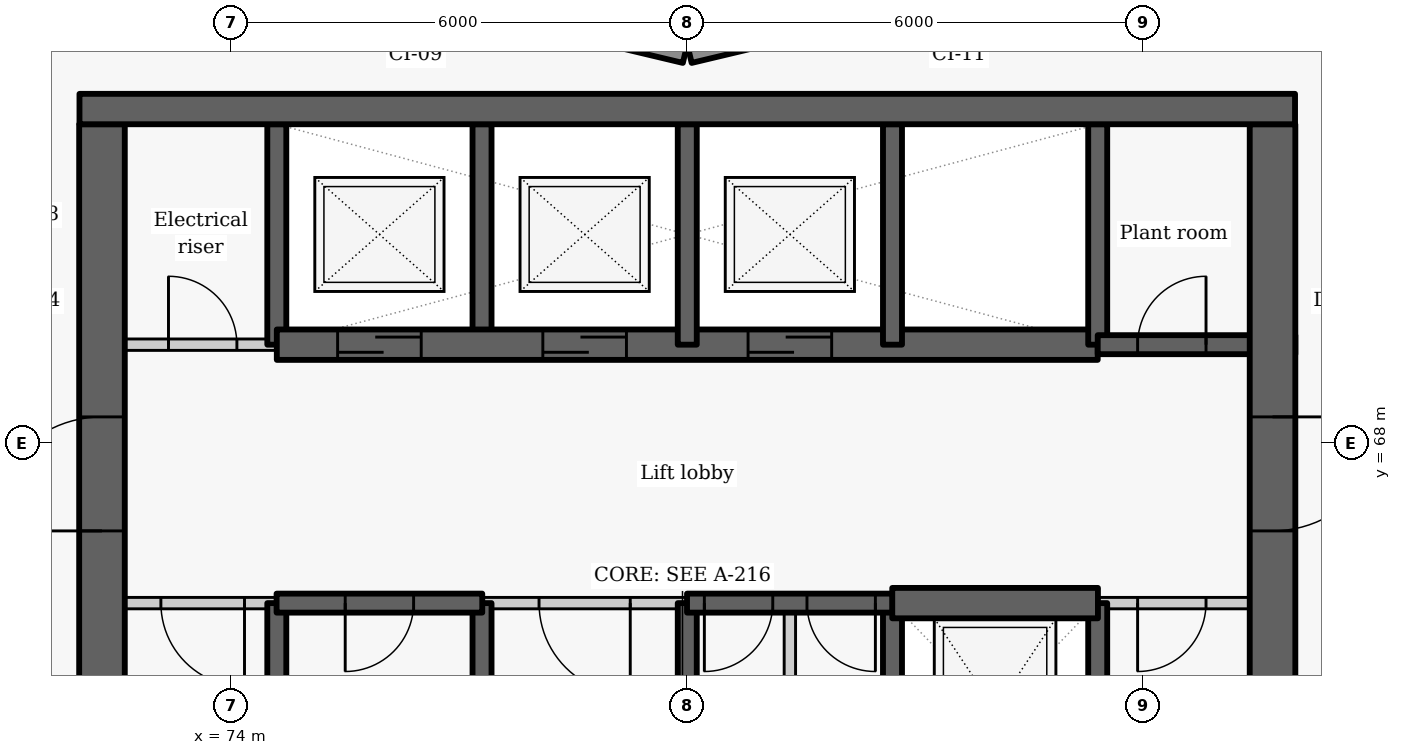
"""IFC4 building model, lengths in metres.
Left out: names, types, materials, properties, quantities, classifications, styles, units other than length and angle.
Written with IfcOpenShell. Run it as: python <this file> out.ifc"""

import sys

from ifc_helpers import new_model, si_unit, direction, frame, frame_2d, origin, place, context, subcontext, project, spatial, rectangle, extrude, element, fill, save


model = new_model("IFC4")
c1 = context("Model", 3, precision=1e-05, world=origin(), true_north=direction((0.0, 1.0)))
c2 = subcontext(c1, "Body", "Model", "MODEL_VIEW")
j1 = project(units=[si_unit("LENGTHUNIT", "METRE"), si_unit("PLANEANGLEUNIT", "RADIAN")], contexts=[c1])
p1 = place(None, origin())
s1 = spatial("IfcSite", under=j1, at=p1, CompositionType="ELEMENT")
p2 = place(p1, origin())
s2 = spatial("IfcBuilding", under=s1, at=p2, CompositionType="ELEMENT")
p3 = place(p2, frame((0.0, 0.0, 77.7)))
s3 = spatial("IfcBuildingStorey", under=s2, at=p3, CompositionType="ELEMENT", Elevation=77.7)
for number, where, z_axis, x_axis in (
    (1, (83.186, 73.881, 0.0), (0.0, 0.0, 1.0), (-0.973, -0.232, 0.0)),
    (2, (79.971, 73.128, 0.0), (0.0, 0.0, 1.0), (-0.973, 0.232, 0.0)),
):
    element("IfcWall", number, at=place(p3, frame(where, z_axis=z_axis, x_axis=x_axis)), inside=s3, PredefinedType="SOLIDWALL", context=c2, shape_type="SweptSolid", body=[
        extrude(rectangle(XDim=3.246, YDim=0.25, at=frame_2d((1.623, 0.0))), origin(), (0.0, 0.0, 1.0), 2.425),
    ])
p4 = place(p3, frame((74.6, 63.1, -0.41), z_axis=(0.0, 0.0, 1.0), x_axis=(0.0, 1.0, 0.0)))
e3 = element("IfcWall", 3, at=p4, inside=s3, PredefinedType="SHEAR", context=c2, shape_type="SweptSolid", body=[
    extrude(rectangle(XDim=2.8, YDim=0.25, at=frame_2d((1.4, 0.0))), origin(), (0.0, 0.0, 1.0), 3.435),
])
p5 = place(p3, frame((74.6, 69.3, -0.41), z_axis=(0.0, 0.0, 1.0), x_axis=(0.0, 1.0, 0.0)))
e4 = element("IfcWall", 4, at=p5, inside=s3, PredefinedType="SHEAR", context=c2, shape_type="SweptSolid", body=[
    extrude(rectangle(XDim=2.9, YDim=0.25, at=frame_2d((1.45, 0.0))), origin(), (0.0, 0.0, 1.0), 3.435),
])
p6 = place(p3, frame((72.0, 69.3, 0.0), z_axis=(0.0, 0.0, 1.0), x_axis=(1.0, 0.0, 0.0)))
e5 = element("IfcWall", 5, at=p6, inside=s3, PredefinedType="PARTITIONING", context=c2, shape_type="SweptSolid", body=[
    extrude(rectangle(XDim=2.6, YDim=0.15, at=frame_2d((1.3, 0.0))), origin(), (0.0, 0.0, 1.0), 3.025),
])
p7 = place(p6, frame((1.175, 0.0, 0.0)))
e6 = element("IfcOpeningElement", 6, at=p7, cuts=e5, PredefinedType="OPENING", context=c2, shape_type="SweptSolid", body=[
    extrude(rectangle(XDim=0.9, YDim=2.1, at=frame_2d((0.45, 1.05))), frame((0.0, 0.085, 0.0), z_axis=(0.0, -1.0, 0.0), x_axis=(1.0, 0.0, 0.0)), (0.0, 0.0, 1.0), 0.17),
])
p8 = place(p3, frame((72.3, 63.1, -0.41), z_axis=(0.0, 0.0, 1.0), x_axis=(0.0, 1.0, 0.0)))
e7 = element("IfcWall", 7, at=p8, inside=s3, PredefinedType="SHEAR", context=c2, shape_type="SweptSolid", body=[
    extrude(rectangle(XDim=9.1, YDim=0.6, at=frame_2d((4.55, 0.0))), origin(), (0.0, 0.0, 1.0), 3.435),
])
p9 = place(p8, frame((3.75, 0.0, 0.41)))
e8 = element("IfcOpeningElement", 8, at=p9, cuts=e7, PredefinedType="OPENING", context=c2, shape_type="SweptSolid", body=[
    extrude(rectangle(XDim=1.5, YDim=2.1, at=frame_2d((0.75, 1.05))), frame((0.0, 0.31, 0.0), z_axis=(0.0, -1.0, 0.0), x_axis=(1.0, 0.0, 0.0)), (0.0, 0.0, 1.0), 0.62),
])
p10 = place(p3, frame((77.3, 63.1, -0.41), z_axis=(0.0, 0.0, 1.0), x_axis=(0.0, 1.0, 0.0)))
e9 = element("IfcWall", 9, at=p10, inside=s3, PredefinedType="SHEAR", context=c2, shape_type="SweptSolid", body=[
    extrude(rectangle(XDim=2.8, YDim=0.25, at=frame_2d((1.4, 0.0))), origin(), (0.0, 0.0, 1.0), 3.435),
])
p11 = place(p3, frame((77.3, 69.3, -0.41), z_axis=(0.0, 0.0, 1.0), x_axis=(0.0, 1.0, 0.0)))
e10 = element("IfcWall", 10, at=p11, inside=s3, PredefinedType="SHEAR", context=c2, shape_type="SweptSolid", body=[
    extrude(rectangle(XDim=2.9, YDim=0.25, at=frame_2d((1.45, 0.0))), origin(), (0.0, 0.0, 1.0), 3.435),
])
p12 = place(p3, frame((74.6, 69.3, -0.41), z_axis=(0.0, 0.0, 1.0), x_axis=(1.0, 0.0, 0.0)))
e11 = element("IfcWall", 11, at=p12, inside=s3, PredefinedType="SHEAR", context=c2, shape_type="SweptSolid", body=[
    extrude(rectangle(XDim=10.8, YDim=0.4, at=frame_2d((5.4, 0.0))), origin(), (0.0, 0.0, 1.0), 3.435),
])
p13 = place(p12, frame((0.8, 0.0, 0.41)))
e12 = element("IfcOpeningElement", 12, at=p13, cuts=e11, PredefinedType="OPENING", context=c2, shape_type="SweptSolid", body=[
    extrude(rectangle(XDim=1.1, YDim=2.1, at=frame_2d((0.55, 1.05))), frame((0.0, 0.21, 0.0), z_axis=(0.0, -1.0, 0.0), x_axis=(1.0, 0.0, 0.0)), (0.0, 0.0, 1.0), 0.42),
])
p14 = place(p12, frame((3.5, 0.0, 0.41)))
e13 = element("IfcOpeningElement", 13, at=p14, cuts=e11, PredefinedType="OPENING", context=c2, shape_type="SweptSolid", body=[
    extrude(rectangle(XDim=1.1, YDim=2.1, at=frame_2d((0.55, 1.05))), frame((0.0, 0.21, 0.0), z_axis=(0.0, -1.0, 0.0), x_axis=(1.0, 0.0, 0.0)), (0.0, 0.0, 1.0), 0.42),
])
p15 = place(p12, frame((6.2, 0.0, 0.41)))
e14 = element("IfcOpeningElement", 14, at=p15, cuts=e11, PredefinedType="OPENING", context=c2, shape_type="SweptSolid", body=[
    extrude(rectangle(XDim=1.1, YDim=2.1, at=frame_2d((0.55, 1.05))), frame((0.0, 0.21, 0.0), z_axis=(0.0, -1.0, 0.0), x_axis=(1.0, 0.0, 0.0)), (0.0, 0.0, 1.0), 0.42),
])
p16 = place(p3, frame((80.0, 63.1, -0.41), z_axis=(0.0, 0.0, 1.0), x_axis=(0.0, 1.0, 0.0)))
e15 = element("IfcWall", 15, at=p16, inside=s3, PredefinedType="SHEAR", context=c2, shape_type="SweptSolid", body=[
    extrude(rectangle(XDim=2.8, YDim=0.25, at=frame_2d((1.4, 0.0))), origin(), (0.0, 0.0, 1.0), 3.435),
])
p17 = place(p3, frame((80.0, 69.3, -0.41), z_axis=(0.0, 0.0, 1.0), x_axis=(0.0, 1.0, 0.0)))
e16 = element("IfcWall", 16, at=p17, inside=s3, PredefinedType="SHEAR", context=c2, shape_type="SweptSolid", body=[
    extrude(rectangle(XDim=2.9, YDim=0.25, at=frame_2d((1.45, 0.0))), origin(), (0.0, 0.0, 1.0), 3.435),
])
p18 = place(p3, frame((82.7, 63.1, -0.41), z_axis=(0.0, 0.0, 1.0), x_axis=(0.0, 1.0, 0.0)))
e17 = element("IfcWall", 17, at=p18, inside=s3, PredefinedType="SHEAR", context=c2, shape_type="SweptSolid", body=[
    extrude(rectangle(XDim=2.8, YDim=0.25, at=frame_2d((1.4, 0.0))), origin(), (0.0, 0.0, 1.0), 3.435),
])
p19 = place(p3, frame((82.7, 69.3, -0.41), z_axis=(0.0, 0.0, 1.0), x_axis=(0.0, 1.0, 0.0)))
e18 = element("IfcWall", 18, at=p19, inside=s3, PredefinedType="SHEAR", context=c2, shape_type="SweptSolid", body=[
    extrude(rectangle(XDim=2.9, YDim=0.25, at=frame_2d((1.45, 0.0))), origin(), (0.0, 0.0, 1.0), 3.435),
])
p20 = place(p3, frame((85.4, 63.1, -0.41), z_axis=(0.0, 0.0, 1.0), x_axis=(0.0, 1.0, 0.0)))
e19 = element("IfcWall", 19, at=p20, inside=s3, PredefinedType="SHEAR", context=c2, shape_type="SweptSolid", body=[
    extrude(rectangle(XDim=2.8, YDim=0.25, at=frame_2d((1.4, 0.0))), origin(), (0.0, 0.0, 1.0), 3.435),
])
p21 = place(p3, frame((85.4, 69.3, -0.41), z_axis=(0.0, 0.0, 1.0), x_axis=(0.0, 1.0, 0.0)))
e20 = element("IfcWall", 20, at=p21, inside=s3, PredefinedType="SHEAR", context=c2, shape_type="SweptSolid", body=[
    extrude(rectangle(XDim=2.9, YDim=0.25, at=frame_2d((1.45, 0.0))), origin(), (0.0, 0.0, 1.0), 3.435),
])
p22 = place(p3, frame((85.4, 69.3, -0.41), z_axis=(0.0, 0.0, 1.0), x_axis=(1.0, 0.0, 0.0)))
e21 = element("IfcWall", 21, at=p22, inside=s3, PredefinedType="SHEAR", context=c2, shape_type="SweptSolid", body=[
    extrude(rectangle(XDim=2.6, YDim=0.25, at=frame_2d((1.3, 0.0))), origin(), (0.0, 0.0, 1.0), 3.435),
])
p23 = place(p22, frame((0.525, 0.0, 0.41)))
e22 = element("IfcOpeningElement", 22, at=p23, cuts=e21, PredefinedType="OPENING", context=c2, shape_type="SweptSolid", body=[
    extrude(rectangle(XDim=0.9, YDim=2.1, at=frame_2d((0.45, 1.05))), frame((0.0, 0.135, 0.0), z_axis=(0.0, -1.0, 0.0), x_axis=(1.0, 0.0, 0.0)), (0.0, 0.0, 1.0), 0.27),
])
p24 = place(p3, frame((87.7, 72.2, -0.41), z_axis=(0.0, 0.0, 1.0), x_axis=(0.0, -1.0, 0.0)))
e23 = element("IfcWall", 23, at=p24, inside=s3, PredefinedType="SHEAR", context=c2, shape_type="SweptSolid", body=[
    extrude(rectangle(XDim=15.6, YDim=0.6, at=frame_2d((7.8, 0.0))), origin(), (0.0, 0.0, 1.0), 3.435),
])
p25 = place(p24, frame((3.85, 0.0, 0.41)))
e24 = element("IfcOpeningElement", 24, at=p25, cuts=e23, PredefinedType="OPENING", context=c2, shape_type="SweptSolid", body=[
    extrude(rectangle(XDim=1.5, YDim=2.1, at=frame_2d((0.75, 1.05))), frame((0.0, 0.31, 0.0), z_axis=(0.0, -1.0, 0.0), x_axis=(1.0, 0.0, 0.0)), (0.0, 0.0, 1.0), 0.62),
])
p26 = place(p24, frame((11.8, 0.0, 0.41)))
e25 = element("IfcOpeningElement", 25, at=p26, cuts=e23, PredefinedType="OPENING", context=c2, shape_type="SweptSolid", body=[
    extrude(rectangle(XDim=1.1, YDim=2.1, at=frame_2d((0.55, 1.05))), frame((0.0, 0.31, 0.0), z_axis=(0.0, -1.0, 0.0), x_axis=(1.0, 0.0, 0.0)), (0.0, 0.0, 1.0), 0.62),
])
p27 = place(p3, frame((74.603, 65.9, 0.0), z_axis=(0.0, 0.0, 1.0), x_axis=(-1.0, 0.0, 0.0)))
e26 = element("IfcWall", 26, at=p27, inside=s3, PredefinedType="PARTITIONING", context=c2, shape_type="SweptSolid", body=[
    extrude(rectangle(XDim=2.603, YDim=0.15, at=frame_2d((1.302, 0.0))), origin(), (0.0, 0.0, 1.0), 3.025),
])
p28 = place(p27, frame((0.428, 0.0, 0.0)))
e27 = element("IfcOpeningElement", 27, at=p28, cuts=e26, PredefinedType="OPENING", context=c2, shape_type="SweptSolid", body=[
    extrude(rectangle(XDim=1.1, YDim=2.1, at=frame_2d((0.55, 1.05))), frame((0.0, 0.085, 0.0), z_axis=(0.0, -1.0, 0.0), x_axis=(1.0, 0.0, 0.0)), (0.0, 0.0, 1.0), 0.17),
])
p29 = place(p3, frame((80.003, 65.9, 0.0), z_axis=(0.0, 0.0, 1.0), x_axis=(-1.0, 0.0, 0.0)))
e28 = element("IfcWall", 28, at=p29, inside=s3, PredefinedType="PARTITIONING", context=c2, shape_type="SweptSolid", body=[
    extrude(rectangle(XDim=2.706, YDim=0.15, at=frame_2d((1.353, 0.0))), origin(), (0.0, 0.0, 1.0), 3.025),
])
p30 = place(p29, frame((0.753, 0.0, 0.0)))
e29 = element("IfcOpeningElement", 29, at=p30, cuts=e28, PredefinedType="OPENING", context=c2, shape_type="SweptSolid", body=[
    extrude(rectangle(XDim=1.2, YDim=2.1, at=frame_2d((0.6, 1.05))), frame((0.0, 0.085, 0.0), z_axis=(0.0, -1.0, 0.0), x_axis=(1.0, 0.0, 0.0)), (0.0, 0.0, 1.0), 0.17),
])
p31 = place(p3, frame((88.0, 65.9, 0.0), z_axis=(0.0, 0.0, 1.0), x_axis=(-1.0, 0.0, 0.0)))
e30 = element("IfcWall", 30, at=p31, inside=s3, PredefinedType="PARTITIONING", context=c2, shape_type="SweptSolid", body=[
    extrude(rectangle(XDim=2.603, YDim=0.15, at=frame_2d((1.302, 0.0))), origin(), (0.0, 0.0, 1.0), 3.025),
])
p32 = place(p31, frame((1.175, 0.0, 0.0)))
e31 = element("IfcOpeningElement", 31, at=p32, cuts=e30, PredefinedType="OPENING", context=c2, shape_type="SweptSolid", body=[
    extrude(rectangle(XDim=0.9, YDim=2.1, at=frame_2d((0.45, 1.05))), frame((0.0, 0.085, 0.0), z_axis=(0.0, -1.0, 0.0), x_axis=(1.0, 0.0, 0.0)), (0.0, 0.0, 1.0), 0.17),
])
p33 = place(p3, frame((77.303, 65.9, -0.41), z_axis=(0.0, 0.0, 1.0), x_axis=(-1.0, 0.0, 0.0)))
e32 = element("IfcWall", 32, at=p33, inside=s3, PredefinedType="SHEAR", context=c2, shape_type="SweptSolid", body=[
    extrude(rectangle(XDim=2.706, YDim=0.25, at=frame_2d((1.353, 0.0))), origin(), (0.0, 0.0, 1.0), 3.435),
])
p34 = place(p33, frame((0.903, 0.0, 0.41)))
e33 = element("IfcOpeningElement", 33, at=p34, cuts=e32, PredefinedType="OPENING", context=c2, shape_type="SweptSolid", body=[
    extrude(rectangle(XDim=0.9, YDim=2.1, at=frame_2d((0.45, 1.05))), frame((0.0, 0.135, 0.0), z_axis=(0.0, -1.0, 0.0), x_axis=(1.0, 0.0, 0.0)), (0.0, 0.0, 1.0), 0.27),
])
p35 = place(p3, frame((82.703, 65.9, -0.41), z_axis=(0.0, 0.0, 1.0), x_axis=(-1.0, 0.0, 0.0)))
e34 = element("IfcWall", 34, at=p35, inside=s3, PredefinedType="SHEAR", context=c2, shape_type="SweptSolid", body=[
    extrude(rectangle(XDim=2.706, YDim=0.25, at=frame_2d((1.353, 0.0))), origin(), (0.0, 0.0, 1.0), 3.435),
])
p36 = place(p35, frame((1.578, 0.0, 0.41)))
e35 = element("IfcOpeningElement", 35, at=p36, cuts=e34, PredefinedType="OPENING", context=c2, shape_type="SweptSolid", body=[
    extrude(rectangle(XDim=0.9, YDim=2.1, at=frame_2d((0.45, 1.05))), frame((0.0, 0.135, 0.0), z_axis=(0.0, -1.0, 0.0), x_axis=(1.0, 0.0, 0.0)), (0.0, 0.0, 1.0), 0.27),
])
p37 = place(p35, frame((0.228, 0.0, 0.41)))
e36 = element("IfcOpeningElement", 36, at=p37, cuts=e34, PredefinedType="OPENING", context=c2, shape_type="SweptSolid", body=[
    extrude(rectangle(XDim=0.9, YDim=2.1, at=frame_2d((0.45, 1.05))), frame((0.0, 0.135, 0.0), z_axis=(0.0, -1.0, 0.0), x_axis=(1.0, 0.0, 0.0)), (0.0, 0.0, 1.0), 0.27),
])
p38 = place(p3, frame((82.697, 65.9, -0.41), z_axis=(0.0, 0.0, 1.0), x_axis=(1.0, 0.0, 0.0)))
e37 = element("IfcWall", 37, at=p38, inside=s3, PredefinedType="SHEAR", context=c2, shape_type="SweptSolid", body=[
    extrude(rectangle(XDim=2.706, YDim=0.4, at=frame_2d((1.353, 0.0))), origin(), (0.0, 0.0, 1.0), 3.435),
])
p39 = place(p3, frame((81.35, 63.1, 0.0), z_axis=(0.0, 0.0, 1.0), x_axis=(0.0, 1.0, 0.0)))
e38 = element("IfcWall", 38, at=p39, inside=s3, PredefinedType="PARTITIONING", context=c2, shape_type="SweptSolid", body=[
    extrude(rectangle(XDim=2.8, YDim=0.15, at=frame_2d((1.4, 0.0))), origin(), (0.0, 0.0, 1.0), 3.025),
])
p40 = place(p3, frame((72.004, 72.4, -0.41), z_axis=(0.0, 0.0, 1.0), x_axis=(1.0, 0.0, 0.0)))
e39 = element("IfcWall", 39, at=p40, inside=s3, PredefinedType="SHEAR", context=c2, shape_type="SweptSolid", body=[
    extrude(rectangle(XDim=15.992, YDim=0.4, at=frame_2d((7.996, 0.0))), origin(), (0.0, 0.0, 1.0), 3.435),
])
p41 = place(p7, origin())
e40 = element("IfcDoor", 40, at=p41, inside=s3, OperationType="SINGLE_SWING_LEFT", PredefinedType="DOOR", context=c2, shape_type="SweptSolid", body=[
    extrude(rectangle(XDim=0.9, YDim=2.1, at=frame_2d((0.45, 1.05))), frame((0.0, 0.025, 0.0), z_axis=(0.0, -1.0, 0.0), x_axis=(1.0, 0.0, 0.0)), (0.0, 0.0, 1.0), 0.05),
])
fill(e6, e40)
p42 = place(p13, origin())
e41 = element("IfcDoor", 41, at=p42, inside=s3, OperationType="SLIDING_TO_LEFT", PredefinedType="DOOR", context=c2, shape_type="SweptSolid", body=[
    extrude(rectangle(XDim=1.1, YDim=2.1, at=frame_2d((0.55, 1.05))), frame((0.0, 0.025, 0.0), z_axis=(0.0, -1.0, 0.0), x_axis=(1.0, 0.0, 0.0)), (0.0, 0.0, 1.0), 0.05),
])
fill(e12, e41)
p43 = place(p14, origin())
e42 = element("IfcDoor", 42, at=p43, inside=s3, OperationType="SLIDING_TO_LEFT", PredefinedType="DOOR", context=c2, shape_type="SweptSolid", body=[
    extrude(rectangle(XDim=1.1, YDim=2.1, at=frame_2d((0.55, 1.05))), frame((0.0, 0.025, 0.0), z_axis=(0.0, -1.0, 0.0), x_axis=(1.0, 0.0, 0.0)), (0.0, 0.0, 1.0), 0.05),
])
fill(e13, e42)
p44 = place(p15, origin())
e43 = element("IfcDoor", 43, at=p44, inside=s3, OperationType="SLIDING_TO_LEFT", PredefinedType="DOOR", context=c2, shape_type="SweptSolid", body=[
    extrude(rectangle(XDim=1.1, YDim=2.1, at=frame_2d((0.55, 1.05))), frame((0.0, 0.025, 0.0), z_axis=(0.0, -1.0, 0.0), x_axis=(1.0, 0.0, 0.0)), (0.0, 0.0, 1.0), 0.05),
])
fill(e14, e43)
p45 = place(p23, origin())
e44 = element("IfcDoor", 44, at=p45, inside=s3, OperationType="SINGLE_SWING_RIGHT", PredefinedType="DOOR", context=c2, shape_type="SweptSolid", body=[
    extrude(rectangle(XDim=0.9, YDim=2.1, at=frame_2d((0.45, 1.05))), frame((0.0, 0.025, 0.0), z_axis=(0.0, -1.0, 0.0), x_axis=(1.0, 0.0, 0.0)), (0.0, 0.0, 1.0), 0.05),
])
fill(e22, e44)
p46 = place(p28, origin())
e45 = element("IfcDoor", 45, at=p46, inside=s3, OperationType="SINGLE_SWING_LEFT", PredefinedType="DOOR", context=c2, shape_type="SweptSolid", body=[
    extrude(rectangle(XDim=1.1, YDim=2.1, at=frame_2d((0.55, 1.05))), frame((0.0, 0.025, 0.0), z_axis=(0.0, -1.0, 0.0), x_axis=(1.0, 0.0, 0.0)), (0.0, 0.0, 1.0), 0.05),
])
fill(e27, e45)
p47 = place(p34, origin())
e46 = element("IfcDoor", 46, at=p47, inside=s3, OperationType="SINGLE_SWING_RIGHT", PredefinedType="DOOR", context=c2, shape_type="SweptSolid", body=[
    extrude(rectangle(XDim=0.9, YDim=2.1, at=frame_2d((0.45, 1.05))), frame((0.0, 0.025, 0.0), z_axis=(0.0, -1.0, 0.0), x_axis=(1.0, 0.0, 0.0)), (0.0, 0.0, 1.0), 0.05),
])
fill(e33, e46)
p48 = place(p30, origin())
e47 = element("IfcDoor", 47, at=p48, inside=s3, OperationType="DOUBLE_DOOR_SINGLE_SWING", PredefinedType="DOOR", context=c2, shape_type="SweptSolid", body=[
    extrude(rectangle(XDim=1.2, YDim=2.1, at=frame_2d((0.6, 1.05))), frame((0.0, 0.025, 0.0), z_axis=(0.0, -1.0, 0.0), x_axis=(1.0, 0.0, 0.0)), (0.0, 0.0, 1.0), 0.05),
])
fill(e29, e47)
p49 = place(p36, origin())
e48 = element("IfcDoor", 48, at=p49, inside=s3, OperationType="SINGLE_SWING_RIGHT", PredefinedType="DOOR", context=c2, shape_type="SweptSolid", body=[
    extrude(rectangle(XDim=0.9, YDim=2.1, at=frame_2d((0.45, 1.05))), frame((0.0, 0.025, 0.0), z_axis=(0.0, -1.0, 0.0), x_axis=(1.0, 0.0, 0.0)), (0.0, 0.0, 1.0), 0.05),
])
fill(e35, e48)
p50 = place(p37, origin())
e49 = element("IfcDoor", 49, at=p50, inside=s3, OperationType="SINGLE_SWING_LEFT", PredefinedType="DOOR", context=c2, shape_type="SweptSolid", body=[
    extrude(rectangle(XDim=0.9, YDim=2.1, at=frame_2d((0.45, 1.05))), frame((0.0, 0.025, 0.0), z_axis=(0.0, -1.0, 0.0), x_axis=(1.0, 0.0, 0.0)), (0.0, 0.0, 1.0), 0.05),
])
fill(e36, e49)
p51 = place(p32, origin())
e50 = element("IfcDoor", 50, at=p51, inside=s3, OperationType="SINGLE_SWING_RIGHT", PredefinedType="DOOR", context=c2, shape_type="SweptSolid", body=[
    extrude(rectangle(XDim=0.9, YDim=2.1, at=frame_2d((0.45, 1.05))), frame((0.0, 0.025, 0.0), z_axis=(0.0, -1.0, 0.0), x_axis=(1.0, 0.0, 0.0)), (0.0, 0.0, 1.0), 0.05),
])
fill(e31, e50)
p52 = place(p25, origin())
e51 = element("IfcDoor", 51, at=p52, inside=s3, OperationType="DOUBLE_DOOR_SINGLE_SWING", PredefinedType="DOOR", context=c2, shape_type="SweptSolid", body=[
    extrude(rectangle(XDim=1.5, YDim=2.1, at=frame_2d((0.75, 1.05))), frame((0.0, 0.025, 0.0), z_axis=(0.0, -1.0, 0.0), x_axis=(1.0, 0.0, 0.0)), (0.0, 0.0, 1.0), 0.05),
])
fill(e24, e51)
p53 = place(p9, origin())
e52 = element("IfcDoor", 52, at=p53, inside=s3, OperationType="DOUBLE_DOOR_SINGLE_SWING", PredefinedType="DOOR", context=c2, shape_type="SweptSolid", body=[
    extrude(rectangle(XDim=1.5, YDim=2.1, at=frame_2d((0.75, 1.05))), frame((0.0, 0.025, 0.0), z_axis=(0.0, -1.0, 0.0), x_axis=(1.0, 0.0, 0.0)), (0.0, 0.0, 1.0), 0.05),
])
fill(e8, e52)
save(model, sys.argv[1])
